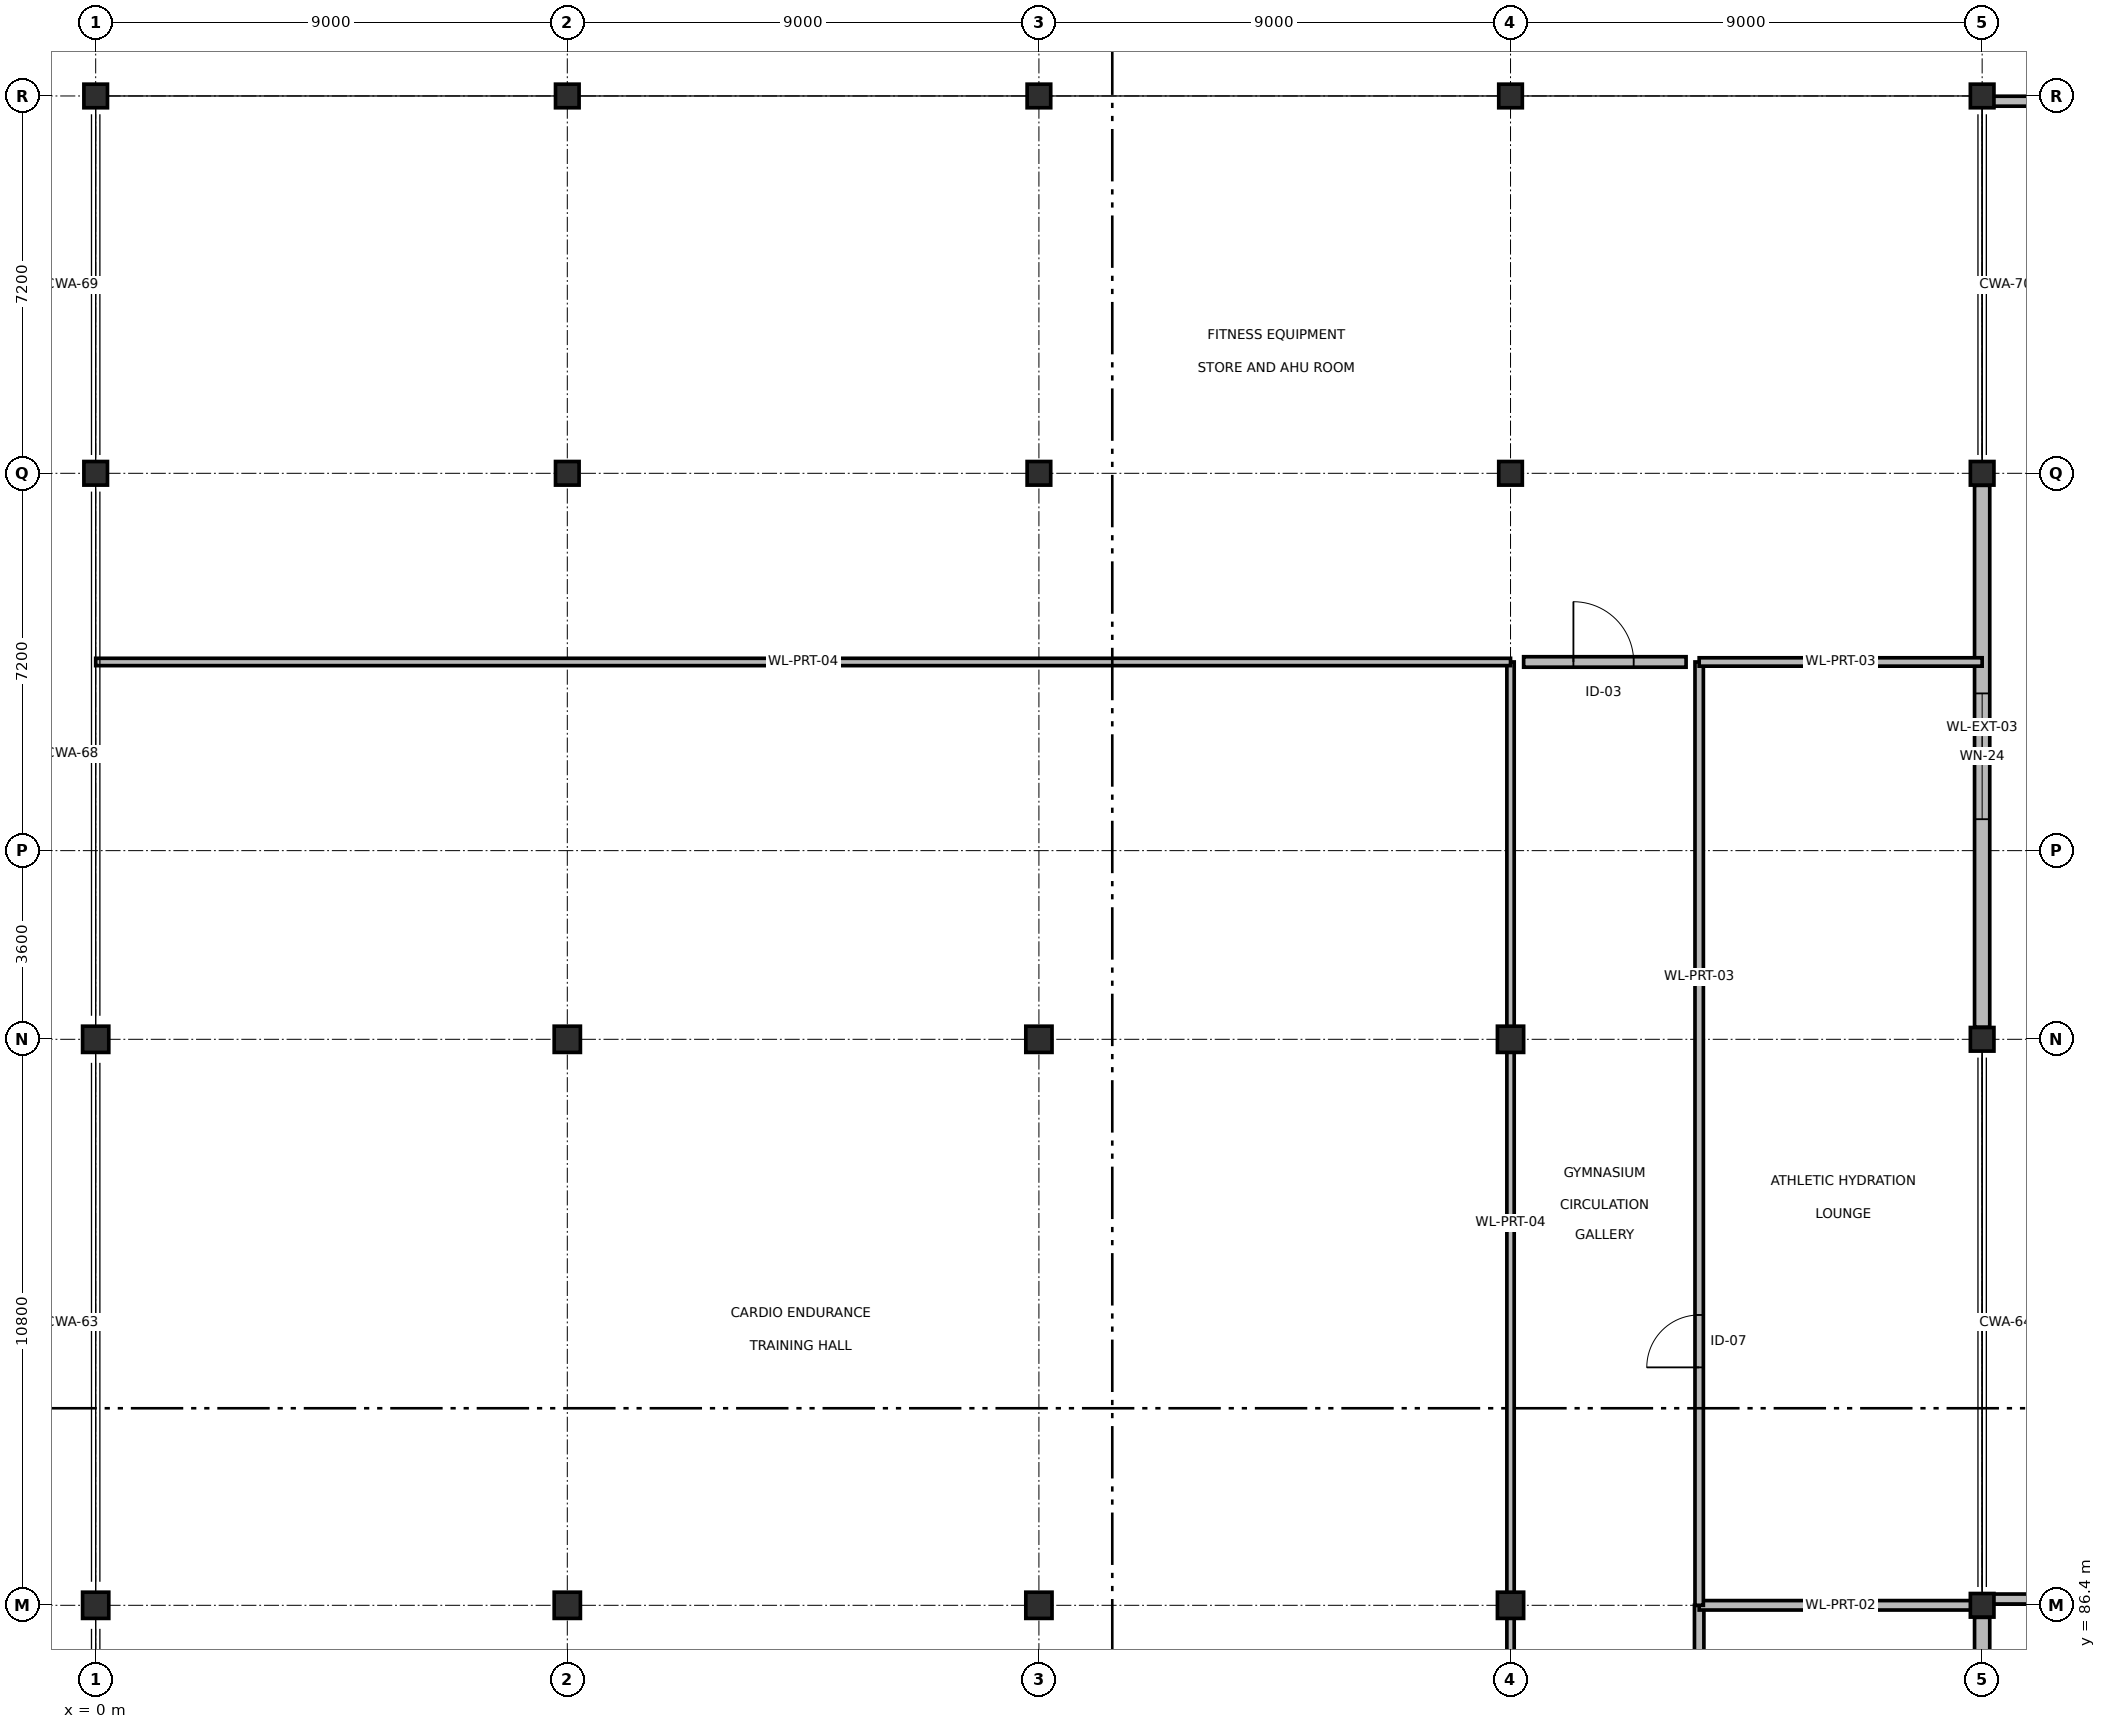
"""IFC4 building model, lengths in metres.
Left out: names, types, materials, properties, quantities, classifications, styles, units other than length and angle.
Written with IfcOpenShell. Run it as: python <this file> out.ifc"""

import sys

from ifc_helpers import new_model, si_unit, direction, frame, frame_2d, origin, origin_2d, place, context, subcontext, project, spatial, rectangle, extrude, element, fill, save


model = new_model("IFC4")
c1 = context("Model", 3, precision=1e-05, world=origin(), true_north=direction((0.0, 1.0)))
c2 = subcontext(c1, "Body", "Model", "MODEL_VIEW")
j1 = project(units=[si_unit("LENGTHUNIT", "METRE"), si_unit("PLANEANGLEUNIT", "RADIAN")], contexts=[c1])
p1 = place(None, origin())
s1 = spatial("IfcSite", under=j1, at=p1, CompositionType="ELEMENT")
p2 = place(p1, origin())
s2 = spatial("IfcBuilding", under=s1, at=p2, CompositionType="ELEMENT")
p3 = place(p2, frame((0.0, 0.0, 9.6)))
s3 = spatial("IfcBuildingStorey", under=s2, at=p3, CompositionType="ELEMENT", Elevation=9.6)
for number, where, z_axis, x_axis in (
    (1, (0.0, 86.4, 0.0), (0.0, 0.0, 1.0), (1.0, 0.0, 0.0)),
    (2, (0.0, 97.2, 0.0), (0.0, 0.0, 1.0), (1.0, 0.0, 0.0)),
    (3, (9.0, 86.4, 0.0), (0.0, 0.0, 1.0), (1.0, 0.0, 0.0)),
    (4, (9.0, 97.2, 0.0), (0.0, 0.0, 1.0), (1.0, 0.0, 0.0)),
    (5, (18.0, 86.4, 0.0), (0.0, 0.0, 1.0), (1.0, 0.0, 0.0)),
    (6, (18.0, 97.2, 0.0), (0.0, 0.0, 1.0), (1.0, 0.0, 0.0)),
    (7, (27.0, 86.4, 0.0), (0.0, 0.0, 1.0), (1.0, 0.0, 0.0)),
    (8, (27.0, 97.2, 0.0), (0.0, 0.0, 1.0), (1.0, 0.0, 0.0)),
):
    element("IfcColumn", number, at=place(p3, frame(where, z_axis=z_axis, x_axis=x_axis)), inside=s3, PredefinedType="COLUMN", context=c2, shape_type="SweptSolid", body=[
        extrude(rectangle(XDim=0.5, YDim=0.5, at=origin_2d()), origin(), (0.0, 0.0, 1.0), 4.5),
    ])
for number, where, z_axis, x_axis in (
    (9, (0.0, 108.0, 0.0), (0.0, 0.0, 1.0), (1.0, 0.0, 0.0)),
    (10, (0.0, 115.2, 0.0), (0.0, 0.0, 1.0), (1.0, 0.0, 0.0)),
    (11, (9.0, 108.0, 0.0), (0.0, 0.0, 1.0), (1.0, 0.0, 0.0)),
    (12, (9.0, 115.2, 0.0), (0.0, 0.0, 1.0), (1.0, 0.0, 0.0)),
    (13, (18.0, 108.0, 0.0), (0.0, 0.0, 1.0), (1.0, 0.0, 0.0)),
    (14, (18.0, 115.2, 0.0), (0.0, 0.0, 1.0), (1.0, 0.0, 0.0)),
    (15, (27.0, 108.0, 0.0), (0.0, 0.0, 1.0), (1.0, 0.0, 0.0)),
    (16, (27.0, 115.2, 0.0), (0.0, 0.0, 1.0), (1.0, 0.0, 0.0)),
    (17, (36.0, 86.4, 0.0), (0.0, 0.0, 1.0), (1.0, 0.0, 0.0)),
    (18, (36.0, 97.2, 0.0), (0.0, 0.0, 1.0), (1.0, 0.0, 0.0)),
    (19, (36.0, 108.0, 0.0), (0.0, 0.0, 1.0), (1.0, 0.0, 0.0)),
    (20, (36.0, 115.2, 0.0), (0.0, 0.0, 1.0), (1.0, 0.0, 0.0)),
):
    element("IfcColumn", number, at=place(p3, frame(where, z_axis=z_axis, x_axis=x_axis)), inside=s3, PredefinedType="COLUMN", context=c2, shape_type="SweptSolid", body=[
        extrude(rectangle(XDim=0.45, YDim=0.45, at=origin_2d()), origin(), (0.0, 0.0, 1.0), 4.5),
    ])
p4 = place(p3, frame((36.0, 86.17, 0.0), z_axis=(0.0, 0.0, 1.0), x_axis=(0.0, -1.0, 0.0)))
e21 = element("IfcWall", 21, at=p4, inside=s3, PredefinedType="SOLIDWALL", context=c2, shape_type="SweptSolid", body=[
    extrude(rectangle(XDim=8.54, YDim=0.29, at=frame_2d((4.27, 0.0))), origin(), (0.0, 0.0, 1.0), 3.525),
])
p5 = place(p3, frame((36.0, 107.77, 0.0), z_axis=(0.0, 0.0, 1.0), x_axis=(0.0, -1.0, 0.0)))
e22 = element("IfcWall", 22, at=p5, inside=s3, PredefinedType="SOLIDWALL", context=c2, shape_type="SweptSolid", body=[
    extrude(rectangle(XDim=10.34, YDim=0.29, at=frame_2d((5.17, 0.0))), origin(), (0.0, 0.0, 1.0), 3.525),
])
p6 = place(p5, frame((3.97, 0.0, 0.85)))
e23 = element("IfcOpeningElement", 23, at=p6, cuts=e22, PredefinedType="OPENING", context=c2, shape_type="SweptSolid", body=[
    extrude(rectangle(XDim=2.4, YDim=2.0, at=frame_2d((1.2, 1.0))), frame((0.0, 0.155, 0.0), z_axis=(0.0, -1.0, 0.0), x_axis=(1.0, 0.0, 0.0)), (0.0, 0.0, 1.0), 0.31),
])
for number, where, z_axis, x_axis in (
    (24, (36.15, 86.52, 0.0), (0.0, 0.0, 1.0), (1.0, 0.0, 0.0)),
    (25, (36.15, 115.1, 0.0), (0.0, 0.0, 1.0), (1.0, 0.0, 0.0)),
):
    element("IfcWall", number, at=place(p3, frame(where, z_axis=z_axis, x_axis=x_axis)), inside=s3, PredefinedType="PARAPET", context=c2, shape_type="SweptSolid", body=[
        extrude(rectangle(XDim=8.75, YDim=0.19, at=frame_2d((4.375, 0.0))), origin(), (0.0, 0.0, 1.0), 1.12),
    ])
p7 = place(p3, frame((27.25, 104.4, 0.0), z_axis=(0.0, 0.0, 1.0), x_axis=(1.0, 0.0, 0.0)))
e26 = element("IfcWall", 26, at=p7, inside=s3, PredefinedType="PARTITIONING", context=c2, shape_type="SweptSolid", body=[
    extrude(rectangle(XDim=3.1, YDim=0.2, at=frame_2d((1.55, 0.0))), origin(), (0.0, 0.0, 1.0), 3.475),
])
p8 = place(p7, frame((0.95, 0.0, 0.0)))
e27 = element("IfcOpeningElement", 27, at=p8, cuts=e26, PredefinedType="OPENING", context=c2, shape_type="SweptSolid", body=[
    extrude(rectangle(XDim=1.15, YDim=2.2, at=frame_2d((0.575, 1.1))), frame((0.0, 0.11, 0.0), z_axis=(0.0, -1.0, 0.0), x_axis=(1.0, 0.0, 0.0)), (0.0, 0.0, 1.0), 0.22),
])
p9 = place(p3, frame((27.0, 68.4, 0.0), z_axis=(0.0, 0.0, 1.0), x_axis=(0.0, 1.0, 0.0)))
e28 = element("IfcWall", 28, at=p9, inside=s3, PredefinedType="PARTITIONING", context=c2, shape_type="SweptSolid", body=[
    extrude(rectangle(XDim=36.0, YDim=0.14, at=frame_2d((18.0, 0.0))), origin(), (0.0, 0.0, 1.0), 3.475),
])
p10 = place(p9, frame((13.205, 0.0, 0.0)))
e29 = element("IfcOpeningElement", 29, at=p10, cuts=e28, PredefinedType="OPENING", context=c2, shape_type="SweptSolid", body=[
    extrude(rectangle(XDim=0.95, YDim=2.1, at=frame_2d((0.475, 1.05))), frame((0.0, 0.08, 0.0), z_axis=(0.0, -1.0, 0.0), x_axis=(1.0, 0.0, 0.0)), (0.0, 0.0, 1.0), 0.16),
])
p11 = place(p3, frame((0.0, 104.4, 0.0), z_axis=(0.0, 0.0, 1.0), x_axis=(1.0, 0.0, 0.0)))
e30 = element("IfcWall", 30, at=p11, inside=s3, PredefinedType="PARTITIONING", context=c2, shape_type="SweptSolid", body=[
    extrude(rectangle(XDim=27.0, YDim=0.14, at=frame_2d((13.5, 0.0))), origin(), (0.0, 0.0, 1.0), 3.475),
])
p12 = place(p3, frame((30.6, 82.0, 0.0), z_axis=(0.0, 0.0, 1.0), x_axis=(0.0, 1.0, 0.0)))
e31 = element("IfcWall", 31, at=p12, inside=s3, PredefinedType="PARTITIONING", context=c2, shape_type="SweptSolid", body=[
    extrude(rectangle(XDim=4.4, YDim=0.18, at=frame_2d((2.2, 0.0))), origin(), (0.0, 0.0, 1.0), 3.575),
])
p13 = place(p12, frame((0.418, 0.0, 0.0)))
e32 = element("IfcOpeningElement", 32, at=p13, cuts=e31, PredefinedType="OPENING", context=c2, shape_type="SweptSolid", body=[
    extrude(rectangle(XDim=1.1, YDim=2.15, at=frame_2d((0.55, 1.075))), frame((0.0, 0.1, 0.0), z_axis=(0.0, -1.0, 0.0), x_axis=(1.0, 0.0, 0.0)), (0.0, 0.0, 1.0), 0.2),
])
p14 = place(p3, frame((30.6, 86.4, 0.0), z_axis=(0.0, 0.0, 1.0), x_axis=(1.0, 0.0, 0.0)))
e33 = element("IfcWall", 33, at=p14, inside=s3, PredefinedType="PARTITIONING", context=c2, shape_type="SweptSolid", body=[
    extrude(rectangle(XDim=5.4, YDim=0.18, at=frame_2d((2.7, 0.0))), origin(), (0.0, 0.0, 1.0), 3.525),
])
p15 = place(p3, frame((30.6, 86.4, 0.0), z_axis=(0.0, 0.0, 1.0), x_axis=(0.0, 1.0, 0.0)))
e34 = element("IfcWall", 34, at=p15, inside=s3, PredefinedType="PARTITIONING", context=c2, shape_type="SweptSolid", body=[
    extrude(rectangle(XDim=18.0, YDim=0.16, at=frame_2d((9.0, 0.0))), origin(), (0.0, 0.0, 1.0), 3.575),
])
p16 = place(p15, frame((4.54, 0.0, 0.0)))
e35 = element("IfcOpeningElement", 35, at=p16, cuts=e34, PredefinedType="OPENING", context=c2, shape_type="SweptSolid", body=[
    extrude(rectangle(XDim=1.0, YDim=2.1, at=frame_2d((0.5, 1.05))), frame((0.0, 0.09, 0.0), z_axis=(0.0, -1.0, 0.0), x_axis=(1.0, 0.0, 0.0)), (0.0, 0.0, 1.0), 0.18),
])
p17 = place(p3, frame((30.6, 104.4, 0.0), z_axis=(0.0, 0.0, 1.0), x_axis=(1.0, 0.0, 0.0)))
e36 = element("IfcWall", 36, at=p17, inside=s3, PredefinedType="PARTITIONING", context=c2, shape_type="SweptSolid", body=[
    extrude(rectangle(XDim=5.4, YDim=0.16, at=frame_2d((2.7, 0.0))), origin(), (0.0, 0.0, 1.0), 3.525),
])
p18 = place(p6, origin())
e37 = element("IfcWindow", 37, at=p18, inside=s3, PartitioningType="SINGLE_PANEL", PredefinedType="WINDOW", context=c2, shape_type="SweptSolid", body=[
    extrude(rectangle(XDim=2.4, YDim=2.0, at=frame_2d((1.2, 1.0))), frame((0.0, 0.03, 0.0), z_axis=(0.0, -1.0, 0.0), x_axis=(1.0, 0.0, 0.0)), (0.0, 0.0, 1.0), 0.06),
])
fill(e23, e37)
p19 = place(p8, origin())
e38 = element("IfcDoor", 38, at=p19, inside=s3, OperationType="SINGLE_SWING_LEFT", PredefinedType="DOOR", context=c2, shape_type="SweptSolid", body=[
    extrude(rectangle(XDim=1.15, YDim=2.2, at=frame_2d((0.575, 1.1))), frame((0.0, 0.025, 0.0), z_axis=(0.0, -1.0, 0.0), x_axis=(1.0, 0.0, 0.0)), (0.0, 0.0, 1.0), 0.05),
])
fill(e27, e38)
p20 = place(p16, origin())
e39 = element("IfcDoor", 39, at=p20, inside=s3, OperationType="SINGLE_SWING_LEFT", PredefinedType="DOOR", context=c2, shape_type="SweptSolid", body=[
    extrude(rectangle(XDim=1.0, YDim=2.1, at=frame_2d((0.5, 1.05))), frame((0.0, 0.025, 0.0), z_axis=(0.0, -1.0, 0.0), x_axis=(1.0, 0.0, 0.0)), (0.0, 0.0, 1.0), 0.05),
])
fill(e35, e39)
save(model, sys.argv[1])
